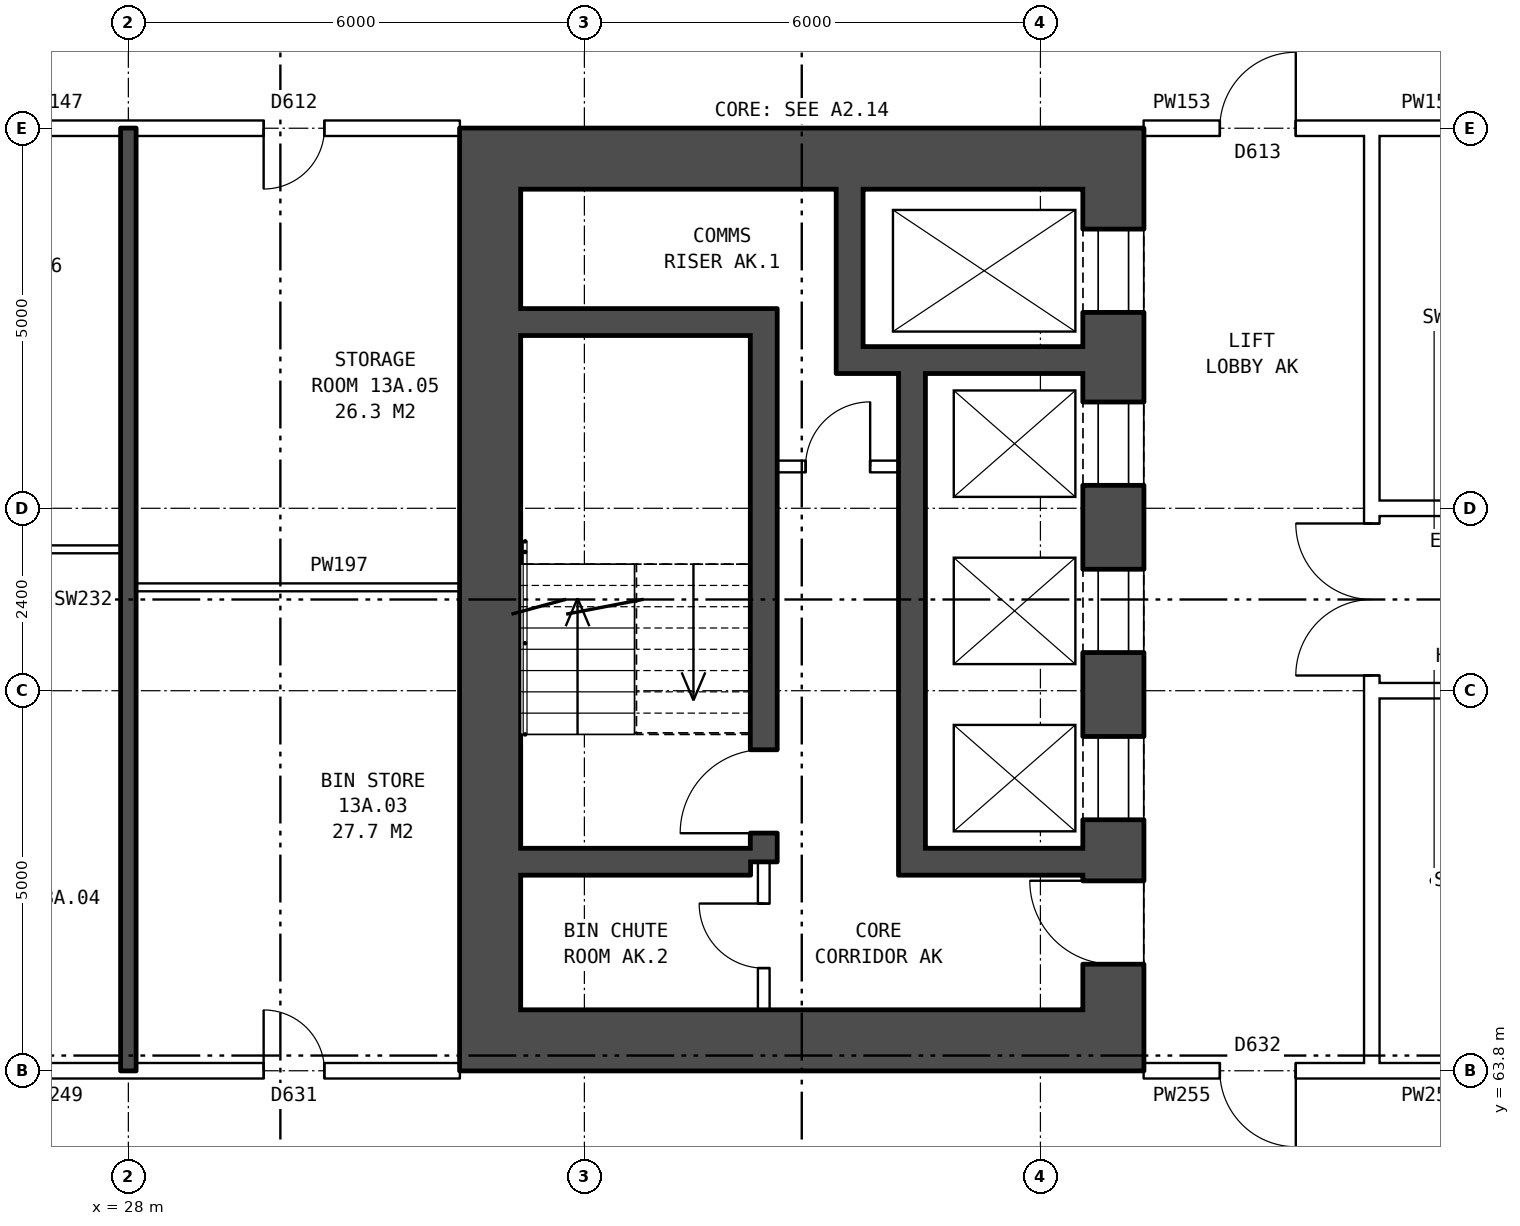
"""IFC4 building model, lengths in metres.
Left out: names, types, materials, properties, quantities, classifications, styles, units other than length and angle.
Written with IfcOpenShell. Run it as: python <this file> out.ifc"""

import sys

from ifc_helpers import new_model, si_unit, direction, frame, frame_2d, origin, place, context, subcontext, project, spatial, rectangle, extrude, element, fill, save


model = new_model("IFC4")
c1 = context("Model", 3, precision=1e-05, world=origin(), true_north=direction((0.0, 1.0)))
c2 = subcontext(c1, "Body", "Model", "MODEL_VIEW")
j1 = project(units=[si_unit("LENGTHUNIT", "METRE"), si_unit("PLANEANGLEUNIT", "RADIAN")], contexts=[c1])
p1 = place(None, origin())
s1 = spatial("IfcSite", under=j1, at=p1, CompositionType="ELEMENT")
p2 = place(p1, origin())
s2 = spatial("IfcBuilding", under=s1, at=p2, CompositionType="ELEMENT")
p3 = place(p2, frame((0.0, 0.0, 50.5)))
s3 = spatial("IfcBuildingStorey", under=s2, at=p3, CompositionType="ELEMENT", Elevation=50.5)
p4 = place(p3, frame((40.96, 75.4, 0.0), z_axis=(0.0, 0.0, 1.0), x_axis=(0.0, -1.0, 0.0)))
e1 = element("IfcWall", 1, at=p4, inside=s3, PredefinedType="SHEAR", context=c2, shape_type="SweptSolid", body=[
    extrude(rectangle(XDim=10.8, YDim=0.8, at=frame_2d((5.4, 0.0))), origin(), (0.0, 0.0, 1.0), 2.85),
])
p5 = place(p4, frame((0.525, 0.0, 0.0)))
e2 = element("IfcOpeningElement", 2, at=p5, cuts=e1, PredefinedType="OPENING", context=c2, shape_type="SweptSolid", body=[
    extrude(rectangle(XDim=1.1, YDim=2.1, at=frame_2d((0.55, 1.05))), frame((0.0, 0.41, 0.0), z_axis=(0.0, -1.0, 0.0), x_axis=(1.0, 0.0, 0.0)), (0.0, 0.0, 1.0), 0.82),
])
p6 = place(p4, frame((2.8, 0.0, 0.0)))
e3 = element("IfcOpeningElement", 3, at=p6, cuts=e1, PredefinedType="OPENING", context=c2, shape_type="SweptSolid", body=[
    extrude(rectangle(XDim=1.1, YDim=2.1, at=frame_2d((0.55, 1.05))), frame((0.0, 0.41, 0.0), z_axis=(0.0, -1.0, 0.0), x_axis=(1.0, 0.0, 0.0)), (0.0, 0.0, 1.0), 0.82),
])
p7 = place(p4, frame((5.0, 0.0, 0.0)))
e4 = element("IfcOpeningElement", 4, at=p7, cuts=e1, PredefinedType="OPENING", context=c2, shape_type="SweptSolid", body=[
    extrude(rectangle(XDim=1.1, YDim=2.1, at=frame_2d((0.55, 1.05))), frame((0.0, 0.41, 0.0), z_axis=(0.0, -1.0, 0.0), x_axis=(1.0, 0.0, 0.0)), (0.0, 0.0, 1.0), 0.82),
])
p8 = place(p4, frame((7.2, 0.0, 0.0)))
e5 = element("IfcOpeningElement", 5, at=p8, cuts=e1, PredefinedType="OPENING", context=c2, shape_type="SweptSolid", body=[
    extrude(rectangle(XDim=1.1, YDim=2.1, at=frame_2d((0.55, 1.05))), frame((0.0, 0.41, 0.0), z_axis=(0.0, -1.0, 0.0), x_axis=(1.0, 0.0, 0.0)), (0.0, 0.0, 1.0), 0.82),
])
p9 = place(p4, frame((9.1, 0.0, 0.0)))
e6 = element("IfcOpeningElement", 6, at=p9, cuts=e1, PredefinedType="OPENING", context=c2, shape_type="SweptSolid", body=[
    extrude(rectangle(XDim=1.1, YDim=2.1, at=frame_2d((0.55, 1.05))), frame((0.0, 0.41, 0.0), z_axis=(0.0, -1.0, 0.0), x_axis=(1.0, 0.0, 0.0)), (0.0, 0.0, 1.0), 0.82),
])
p10 = place(p3, frame((32.76, 75.4, 0.0), z_axis=(0.0, 0.0, 1.0), x_axis=(0.0, -1.0, 0.0)))
e7 = element("IfcWall", 7, at=p10, inside=s3, PredefinedType="SHEAR", context=c2, shape_type="SweptSolid", body=[
    extrude(rectangle(XDim=10.8, YDim=0.8, at=frame_2d((5.4, 0.0))), origin(), (0.0, 0.0, 1.0), 2.85),
])
for number, where, z_axis, x_axis in (
    (8, (41.36, 75.8, 0.0), (0.0, 0.0, 1.0), (-1.0, 0.0, 0.0)),
    (9, (41.36, 64.2, 0.0), (0.0, 0.0, 1.0), (-1.0, 0.0, 0.0)),
):
    element("IfcWall", number, at=place(p3, frame(where, z_axis=z_axis, x_axis=x_axis)), inside=s3, PredefinedType="SHEAR", context=c2, shape_type="SweptSolid", body=[
        extrude(rectangle(XDim=9.0, YDim=0.8, at=frame_2d((4.5, 0.0))), origin(), (0.0, 0.0, 1.0), 2.85),
    ])
p11 = place(p3, frame((36.185, 73.65, 0.0), z_axis=(0.0, 0.0, 1.0), x_axis=(-1.0, 0.0, 0.0)))
e10 = element("IfcWall", 10, at=p11, inside=s3, PredefinedType="SHEAR", context=c2, shape_type="SweptSolid", body=[
    extrude(rectangle(XDim=3.025, YDim=0.35, at=frame_2d((1.513, 0.0))), origin(), (0.0, 0.0, 1.0), 2.85),
])
p12 = place(p3, frame((40.56, 73.15, 0.0), z_axis=(0.0, 0.0, 1.0), x_axis=(-1.0, 0.0, 0.0)))
e11 = element("IfcWall", 11, at=p12, inside=s3, PredefinedType="SHEAR", context=c2, shape_type="SweptSolid", body=[
    extrude(rectangle(XDim=3.245, YDim=0.35, at=frame_2d((1.623, 0.0))), origin(), (0.0, 0.0, 1.0), 2.85),
])
p13 = place(p3, frame((38.135, 71.75, 0.0), z_axis=(0.0, 0.0, 1.0), x_axis=(-1.0, 0.0, 0.0)))
e12 = element("IfcWall", 12, at=p13, inside=s3, PredefinedType="PARTITIONING", context=c2, shape_type="SweptSolid", body=[
    extrude(rectangle(XDim=1.6, YDim=0.15, at=frame_2d((0.8, 0.0))), origin(), (0.0, 0.0, 1.0), 2.85),
])
p14 = place(p13, frame((0.375, 0.0, 0.0)))
e13 = element("IfcOpeningElement", 13, at=p14, cuts=e12, PredefinedType="OPENING", context=c2, shape_type="SweptSolid", body=[
    extrude(rectangle(XDim=0.85, YDim=2.1, at=frame_2d((0.425, 1.05))), frame((0.0, 0.085, 0.0), z_axis=(0.0, -1.0, 0.0), x_axis=(1.0, 0.0, 0.0)), (0.0, 0.0, 1.0), 0.17),
])
p15 = place(p3, frame((40.56, 66.55, 0.0), z_axis=(0.0, 0.0, 1.0), x_axis=(-1.0, 0.0, 0.0)))
e14 = element("IfcWall", 14, at=p15, inside=s3, PredefinedType="SHEAR", context=c2, shape_type="SweptSolid", body=[
    extrude(rectangle(XDim=2.075, YDim=0.35, at=frame_2d((1.038, 0.0))), origin(), (0.0, 0.0, 1.0), 2.85),
])
p16 = place(p3, frame((36.185, 66.55, 0.0), z_axis=(0.0, 0.0, 1.0), x_axis=(-1.0, 0.0, 0.0)))
e15 = element("IfcWall", 15, at=p16, inside=s3, PredefinedType="SHEAR", context=c2, shape_type="SweptSolid", body=[
    extrude(rectangle(XDim=3.025, YDim=0.35, at=frame_2d((1.513, 0.0))), origin(), (0.0, 0.0, 1.0), 2.85),
])
p17 = place(p3, frame((38.31, 72.975, 0.0), z_axis=(0.0, 0.0, 1.0), x_axis=(0.0, -1.0, 0.0)))
e16 = element("IfcWall", 16, at=p17, inside=s3, PredefinedType="SHEAR", context=c2, shape_type="SweptSolid", body=[
    extrude(rectangle(XDim=6.6, YDim=0.35, at=frame_2d((3.3, 0.0))), origin(), (0.0, 0.0, 1.0), 2.85),
])
p18 = place(p3, frame((37.49, 75.4, 0.0), z_axis=(0.0, 0.0, 1.0), x_axis=(0.0, -1.0, 0.0)))
e17 = element("IfcWall", 17, at=p18, inside=s3, PredefinedType="SHEAR", context=c2, shape_type="SweptSolid", body=[
    extrude(rectangle(XDim=2.075, YDim=0.35, at=frame_2d((1.038, 0.0))), origin(), (0.0, 0.0, 1.0), 2.85),
])
p19 = place(p3, frame((36.36, 73.825, 0.0), z_axis=(0.0, 0.0, 1.0), x_axis=(0.0, -1.0, 0.0)))
e18 = element("IfcWall", 18, at=p19, inside=s3, PredefinedType="SHEAR", context=c2, shape_type="SweptSolid", body=[
    extrude(rectangle(XDim=7.275, YDim=0.35, at=frame_2d((3.637, 0.0))), origin(), (0.0, 0.0, 1.0), 2.85),
])
p20 = place(p19, frame((5.8, 0.0, 0.0)))
e19 = element("IfcOpeningElement", 19, at=p20, cuts=e18, PredefinedType="OPENING", context=c2, shape_type="SweptSolid", body=[
    extrude(rectangle(XDim=1.1, YDim=2.1, at=frame_2d((0.55, 1.05))), frame((0.0, 0.185, 0.0), z_axis=(0.0, -1.0, 0.0), x_axis=(1.0, 0.0, 0.0)), (0.0, 0.0, 1.0), 0.37),
])
p21 = place(p3, frame((36.36, 66.55, 0.0), z_axis=(0.0, 0.0, 1.0), x_axis=(0.0, -1.0, 0.0)))
e20 = element("IfcWall", 20, at=p21, inside=s3, PredefinedType="PARTITIONING", context=c2, shape_type="SweptSolid", body=[
    extrude(rectangle(XDim=1.95, YDim=0.15, at=frame_2d((0.975, 0.0))), origin(), (0.0, 0.0, 1.0), 2.85),
])
p22 = place(p21, frame((0.55, 0.0, 0.0)))
e21 = element("IfcOpeningElement", 21, at=p22, cuts=e20, PredefinedType="OPENING", context=c2, shape_type="SweptSolid", body=[
    extrude(rectangle(XDim=0.85, YDim=2.1, at=frame_2d((0.425, 1.05))), frame((0.0, 0.085, 0.0), z_axis=(0.0, -1.0, 0.0), x_axis=(1.0, 0.0, 0.0)), (0.0, 0.0, 1.0), 0.17),
])
p23 = place(p3, frame((44.36, 63.9, 0.0), z_axis=(0.0, 0.0, 1.0), x_axis=(0.0, 1.0, 0.0)))
e22 = element("IfcWall", 22, at=p23, inside=s3, PredefinedType="PARTITIONING", context=c2, shape_type="SweptSolid", body=[
    extrude(rectangle(XDim=12.2, YDim=0.2, at=frame_2d((6.1, 0.0))), origin(), (0.0, 0.0, 1.0), 2.85),
])
p24 = place(p23, frame((5.1, 0.0, 0.0)))
e23 = element("IfcOpeningElement", 23, at=p24, cuts=e22, PredefinedType="OPENING", context=c2, shape_type="SweptSolid", body=[
    extrude(rectangle(XDim=2.0, YDim=2.1, at=frame_2d((1.0, 1.05))), frame((0.0, 0.11, 0.0), z_axis=(0.0, -1.0, 0.0), x_axis=(1.0, 0.0, 0.0)), (0.0, 0.0, 1.0), 0.22),
])
p25 = place(p3, frame((24.26, 63.8, 0.0), z_axis=(0.0, 0.0, 1.0), x_axis=(1.0, 0.0, 0.0)))
e24 = element("IfcWall", 24, at=p25, inside=s3, PredefinedType="PARTITIONING", context=c2, shape_type="SweptSolid", body=[
    extrude(rectangle(XDim=8.1, YDim=0.2, at=frame_2d((4.05, 0.0))), origin(), (0.0, 0.0, 1.0), 2.85),
])
p26 = place(p25, frame((5.52, 0.0, 0.0)))
e25 = element("IfcOpeningElement", 25, at=p26, cuts=e24, PredefinedType="OPENING", context=c2, shape_type="SweptSolid", body=[
    extrude(rectangle(XDim=0.8, YDim=2.1, at=frame_2d((0.4, 1.05))), frame((0.0, 0.11, 0.0), z_axis=(0.0, -1.0, 0.0), x_axis=(1.0, 0.0, 0.0)), (0.0, 0.0, 1.0), 0.22),
])
p27 = place(p3, frame((41.36, 63.8, 0.0), z_axis=(0.0, 0.0, 1.0), x_axis=(1.0, 0.0, 0.0)))
e26 = element("IfcWall", 26, at=p27, inside=s3, PredefinedType="PARTITIONING", context=c2, shape_type="SweptSolid", body=[
    extrude(rectangle(XDim=3.0, YDim=0.2, at=frame_2d((1.5, 0.0))), origin(), (0.0, 0.0, 1.0), 2.85),
])
p28 = place(p27, frame((1.0, 0.0, 0.0)))
e27 = element("IfcOpeningElement", 27, at=p28, cuts=e26, PredefinedType="OPENING", context=c2, shape_type="SweptSolid", body=[
    extrude(rectangle(XDim=1.0, YDim=2.1, at=frame_2d((0.5, 1.05))), frame((0.0, 0.11, 0.0), z_axis=(0.0, -1.0, 0.0), x_axis=(1.0, 0.0, 0.0)), (0.0, 0.0, 1.0), 0.22),
])
p29 = place(p3, frame((44.36, 63.8, 0.0), z_axis=(0.0, 0.0, 1.0), x_axis=(1.0, 0.0, 0.0)))
e28 = element("IfcWall", 28, at=p29, inside=s3, PredefinedType="PARTITIONING", context=c2, shape_type="SweptSolid", body=[
    extrude(rectangle(XDim=1.54, YDim=0.2, at=frame_2d((0.77, 0.0))), origin(), (0.0, 0.0, 1.0), 2.85),
])
p30 = place(p3, frame((44.36, 68.8, 0.0), z_axis=(0.0, 0.0, 1.0), x_axis=(1.0, 0.0, 0.0)))
e29 = element("IfcWall", 29, at=p30, inside=s3, PredefinedType="PARTITIONING", context=c2, shape_type="SweptSolid", body=[
    extrude(rectangle(XDim=19.28, YDim=0.2, at=frame_2d((9.64, 0.0))), origin(), (0.0, 0.0, 1.0), 2.85),
])
p31 = place(p30, frame((14.64, 0.0, 0.0)))
e30 = element("IfcOpeningElement", 30, at=p31, cuts=e29, PredefinedType="OPENING", context=c2, shape_type="SweptSolid", body=[
    extrude(rectangle(XDim=1.0, YDim=2.1, at=frame_2d((0.5, 1.05))), frame((0.0, 0.11, 0.0), z_axis=(0.0, -1.0, 0.0), x_axis=(1.0, 0.0, 0.0)), (0.0, 0.0, 1.0), 0.22),
])
p32 = place(p30, frame((5.64, 0.0, 0.0)))
e31 = element("IfcOpeningElement", 31, at=p32, cuts=e29, PredefinedType="OPENING", context=c2, shape_type="SweptSolid", body=[
    extrude(rectangle(XDim=1.0, YDim=2.1, at=frame_2d((0.5, 1.05))), frame((0.0, 0.11, 0.0), z_axis=(0.0, -1.0, 0.0), x_axis=(1.0, 0.0, 0.0)), (0.0, 0.0, 1.0), 0.22),
])
p33 = place(p3, frame((28.1, 70.16, 0.0), z_axis=(0.0, 0.0, 1.0), x_axis=(1.0, 0.0, 0.0)))
e32 = element("IfcWall", 32, at=p33, inside=s3, PredefinedType="PARTITIONING", context=c2, shape_type="SweptSolid", body=[
    extrude(rectangle(XDim=4.26, YDim=0.1, at=frame_2d((2.13, 0.0))), origin(), (0.0, 0.0, 1.0), 2.85),
])
p34 = place(p3, frame((24.36, 70.66, 0.0), z_axis=(0.0, 0.0, 1.0), x_axis=(1.0, 0.0, 0.0)))
e33 = element("IfcWall", 33, at=p34, inside=s3, PredefinedType="PARTITIONING", context=c2, shape_type="SweptSolid", body=[
    extrude(rectangle(XDim=3.54, YDim=0.1, at=frame_2d((1.77, 0.0))), origin(), (0.0, 0.0, 1.0), 2.85),
])
p35 = place(p3, frame((44.36, 71.2, 0.0), z_axis=(0.0, 0.0, 1.0), x_axis=(1.0, 0.0, 0.0)))
e34 = element("IfcWall", 34, at=p35, inside=s3, PredefinedType="PARTITIONING", context=c2, shape_type="SweptSolid", body=[
    extrude(rectangle(XDim=19.28, YDim=0.2, at=frame_2d((9.64, 0.0))), origin(), (0.0, 0.0, 1.0), 2.85),
])
p36 = place(p35, frame((14.64, 0.0, 0.0)))
e35 = element("IfcOpeningElement", 35, at=p36, cuts=e34, PredefinedType="OPENING", context=c2, shape_type="SweptSolid", body=[
    extrude(rectangle(XDim=1.0, YDim=2.1, at=frame_2d((0.5, 1.05))), frame((0.0, 0.11, 0.0), z_axis=(0.0, -1.0, 0.0), x_axis=(1.0, 0.0, 0.0)), (0.0, 0.0, 1.0), 0.22),
])
p37 = place(p35, frame((5.64, 0.0, 0.0)))
e36 = element("IfcOpeningElement", 36, at=p37, cuts=e34, PredefinedType="OPENING", context=c2, shape_type="SweptSolid", body=[
    extrude(rectangle(XDim=1.0, YDim=2.1, at=frame_2d((0.5, 1.05))), frame((0.0, 0.11, 0.0), z_axis=(0.0, -1.0, 0.0), x_axis=(1.0, 0.0, 0.0)), (0.0, 0.0, 1.0), 0.22),
])
p38 = place(p3, frame((24.26, 76.2, 0.0), z_axis=(0.0, 0.0, 1.0), x_axis=(1.0, 0.0, 0.0)))
e37 = element("IfcWall", 37, at=p38, inside=s3, PredefinedType="PARTITIONING", context=c2, shape_type="SweptSolid", body=[
    extrude(rectangle(XDim=8.1, YDim=0.2, at=frame_2d((4.05, 0.0))), origin(), (0.0, 0.0, 1.0), 2.85),
])
p39 = place(p38, frame((5.52, 0.0, 0.0)))
e38 = element("IfcOpeningElement", 38, at=p39, cuts=e37, PredefinedType="OPENING", context=c2, shape_type="SweptSolid", body=[
    extrude(rectangle(XDim=0.8, YDim=2.1, at=frame_2d((0.4, 1.05))), frame((0.0, 0.11, 0.0), z_axis=(0.0, -1.0, 0.0), x_axis=(1.0, 0.0, 0.0)), (0.0, 0.0, 1.0), 0.22),
])
p40 = place(p3, frame((41.36, 76.2, 0.0), z_axis=(0.0, 0.0, 1.0), x_axis=(1.0, 0.0, 0.0)))
e39 = element("IfcWall", 39, at=p40, inside=s3, PredefinedType="PARTITIONING", context=c2, shape_type="SweptSolid", body=[
    extrude(rectangle(XDim=3.0, YDim=0.2, at=frame_2d((1.5, 0.0))), origin(), (0.0, 0.0, 1.0), 2.85),
])
p41 = place(p40, frame((1.0, 0.0, 0.0)))
e40 = element("IfcOpeningElement", 40, at=p41, cuts=e39, PredefinedType="OPENING", context=c2, shape_type="SweptSolid", body=[
    extrude(rectangle(XDim=1.0, YDim=2.1, at=frame_2d((0.5, 1.05))), frame((0.0, 0.11, 0.0), z_axis=(0.0, -1.0, 0.0), x_axis=(1.0, 0.0, 0.0)), (0.0, 0.0, 1.0), 0.22),
])
p42 = place(p3, frame((44.36, 76.2, 0.0), z_axis=(0.0, 0.0, 1.0), x_axis=(1.0, 0.0, 0.0)))
e41 = element("IfcWall", 41, at=p42, inside=s3, PredefinedType="PARTITIONING", context=c2, shape_type="SweptSolid", body=[
    extrude(rectangle(XDim=1.54, YDim=0.2, at=frame_2d((0.77, 0.0))), origin(), (0.0, 0.0, 1.0), 2.85),
])
p43 = place(p3, frame((28.0, 63.8, 0.0), z_axis=(0.0, 0.0, 1.0), x_axis=(0.0, 1.0, 0.0)))
e42 = element("IfcWall", 42, at=p43, inside=s3, PredefinedType="SOLIDWALL", context=c2, shape_type="SweptSolid", body=[
    extrude(rectangle(XDim=12.4, YDim=0.2, at=frame_2d((6.2, 0.0))), origin(), (0.0, 0.0, 1.0), 2.85),
])
p44 = place(p5, origin())
e43 = element("IfcDoor", 43, at=p44, inside=s3, OperationType="DOUBLE_DOOR_SLIDING", PredefinedType="DOOR", context=c2, shape_type="SweptSolid", body=[
    extrude(rectangle(XDim=1.1, YDim=2.1, at=frame_2d((0.55, 1.05))), frame((0.0, -0.335, 0.0), z_axis=(0.0, -1.0, 0.0), x_axis=(1.0, 0.0, 0.0)), (0.0, 0.0, 1.0), 0.05),
])
fill(e2, e43)
p45 = place(p6, origin())
e44 = element("IfcDoor", 44, at=p45, inside=s3, OperationType="DOUBLE_DOOR_SLIDING", PredefinedType="DOOR", context=c2, shape_type="SweptSolid", body=[
    extrude(rectangle(XDim=1.1, YDim=2.1, at=frame_2d((0.55, 1.05))), frame((0.0, -0.335, 0.0), z_axis=(0.0, -1.0, 0.0), x_axis=(1.0, 0.0, 0.0)), (0.0, 0.0, 1.0), 0.05),
])
fill(e3, e44)
p46 = place(p7, origin())
e45 = element("IfcDoor", 45, at=p46, inside=s3, OperationType="DOUBLE_DOOR_SLIDING", PredefinedType="DOOR", context=c2, shape_type="SweptSolid", body=[
    extrude(rectangle(XDim=1.1, YDim=2.1, at=frame_2d((0.55, 1.05))), frame((0.0, -0.335, 0.0), z_axis=(0.0, -1.0, 0.0), x_axis=(1.0, 0.0, 0.0)), (0.0, 0.0, 1.0), 0.05),
])
fill(e4, e45)
p47 = place(p8, origin())
e46 = element("IfcDoor", 46, at=p47, inside=s3, OperationType="DOUBLE_DOOR_SLIDING", PredefinedType="DOOR", context=c2, shape_type="SweptSolid", body=[
    extrude(rectangle(XDim=1.1, YDim=2.1, at=frame_2d((0.55, 1.05))), frame((0.0, -0.335, 0.0), z_axis=(0.0, -1.0, 0.0), x_axis=(1.0, 0.0, 0.0)), (0.0, 0.0, 1.0), 0.05),
])
fill(e5, e46)
p48 = place(p9, frame((1.1, 0.0, 0.0), z_axis=(0.0, 0.0, 1.0), x_axis=(-1.0, 0.0, 0.0)))
e47 = element("IfcDoor", 47, at=p48, inside=s3, OperationType="SINGLE_SWING_RIGHT", PredefinedType="DOOR", context=c2, shape_type="SweptSolid", body=[
    extrude(rectangle(XDim=1.1, YDim=2.1, at=frame_2d((0.55, 1.05))), frame((0.0, 0.385, 0.0), z_axis=(0.0, -1.0, 0.0), x_axis=(1.0, 0.0, 0.0)), (0.0, 0.0, 1.0), 0.05),
])
fill(e6, e47)
p49 = place(p20, frame((1.1, 0.0, 0.0), z_axis=(0.0, 0.0, 1.0), x_axis=(-1.0, 0.0, 0.0)))
e48 = element("IfcDoor", 48, at=p49, inside=s3, OperationType="SINGLE_SWING_LEFT", PredefinedType="DOOR", context=c2, shape_type="SweptSolid", body=[
    extrude(rectangle(XDim=1.1, YDim=2.1, at=frame_2d((0.55, 1.05))), frame((0.0, 0.025, 0.0), z_axis=(0.0, -1.0, 0.0), x_axis=(1.0, 0.0, 0.0)), (0.0, 0.0, 1.0), 0.05),
])
fill(e19, e48)
p50 = place(p14, frame((0.85, 0.0, 0.0), z_axis=(0.0, 0.0, 1.0), x_axis=(-1.0, 0.0, 0.0)))
e49 = element("IfcDoor", 49, at=p50, inside=s3, OperationType="SINGLE_SWING_RIGHT", PredefinedType="DOOR", context=c2, shape_type="SweptSolid", body=[
    extrude(rectangle(XDim=0.85, YDim=2.1, at=frame_2d((0.425, 1.05))), frame((0.0, 0.025, 0.0), z_axis=(0.0, -1.0, 0.0), x_axis=(1.0, 0.0, 0.0)), (0.0, 0.0, 1.0), 0.05),
])
fill(e13, e49)
p51 = place(p22, frame((0.85, 0.0, 0.0), z_axis=(0.0, 0.0, 1.0), x_axis=(-1.0, 0.0, 0.0)))
e50 = element("IfcDoor", 50, at=p51, inside=s3, OperationType="SINGLE_SWING_RIGHT", PredefinedType="DOOR", context=c2, shape_type="SweptSolid", body=[
    extrude(rectangle(XDim=0.85, YDim=2.1, at=frame_2d((0.425, 1.05))), frame((0.0, 0.025, 0.0), z_axis=(0.0, -1.0, 0.0), x_axis=(1.0, 0.0, 0.0)), (0.0, 0.0, 1.0), 0.05),
])
fill(e21, e50)
p52 = place(p24, origin())
e51 = element("IfcDoor", 51, at=p52, inside=s3, OperationType="DOUBLE_DOOR_SINGLE_SWING", PredefinedType="DOOR", context=c2, shape_type="SweptSolid", body=[
    extrude(rectangle(XDim=2.0, YDim=2.1, at=frame_2d((1.0, 1.05))), frame((0.0, 0.025, 0.0), z_axis=(0.0, -1.0, 0.0), x_axis=(1.0, 0.0, 0.0)), (0.0, 0.0, 1.0), 0.05),
])
fill(e23, e51)
p53 = place(p28, frame((1.0, 0.0, 0.0), z_axis=(0.0, 0.0, 1.0), x_axis=(-1.0, 0.0, 0.0)))
e52 = element("IfcDoor", 52, at=p53, inside=s3, OperationType="SINGLE_SWING_LEFT", PredefinedType="DOOR", context=c2, shape_type="SweptSolid", body=[
    extrude(rectangle(XDim=1.0, YDim=2.1, at=frame_2d((0.5, 1.05))), frame((0.0, 0.025, 0.0), z_axis=(0.0, -1.0, 0.0), x_axis=(1.0, 0.0, 0.0)), (0.0, 0.0, 1.0), 0.05),
])
fill(e27, e52)
p54 = place(p41, origin())
e53 = element("IfcDoor", 53, at=p54, inside=s3, OperationType="SINGLE_SWING_RIGHT", PredefinedType="DOOR", context=c2, shape_type="SweptSolid", body=[
    extrude(rectangle(XDim=1.0, YDim=2.1, at=frame_2d((0.5, 1.05))), frame((0.0, 0.025, 0.0), z_axis=(0.0, -1.0, 0.0), x_axis=(1.0, 0.0, 0.0)), (0.0, 0.0, 1.0), 0.05),
])
fill(e40, e53)
p55 = place(p26, origin())
e54 = element("IfcDoor", 54, at=p55, inside=s3, OperationType="SINGLE_SWING_LEFT", PredefinedType="DOOR", context=c2, shape_type="SweptSolid", body=[
    extrude(rectangle(XDim=0.8, YDim=2.1, at=frame_2d((0.4, 1.05))), frame((0.0, 0.025, 0.0), z_axis=(0.0, -1.0, 0.0), x_axis=(1.0, 0.0, 0.0)), (0.0, 0.0, 1.0), 0.05),
])
fill(e25, e54)
p56 = place(p39, frame((0.8, 0.0, 0.0), z_axis=(0.0, 0.0, 1.0), x_axis=(-1.0, 0.0, 0.0)))
e55 = element("IfcDoor", 55, at=p56, inside=s3, OperationType="SINGLE_SWING_RIGHT", PredefinedType="DOOR", context=c2, shape_type="SweptSolid", body=[
    extrude(rectangle(XDim=0.8, YDim=2.1, at=frame_2d((0.4, 1.05))), frame((0.0, 0.025, 0.0), z_axis=(0.0, -1.0, 0.0), x_axis=(1.0, 0.0, 0.0)), (0.0, 0.0, 1.0), 0.05),
])
fill(e38, e55)
save(model, sys.argv[1])
